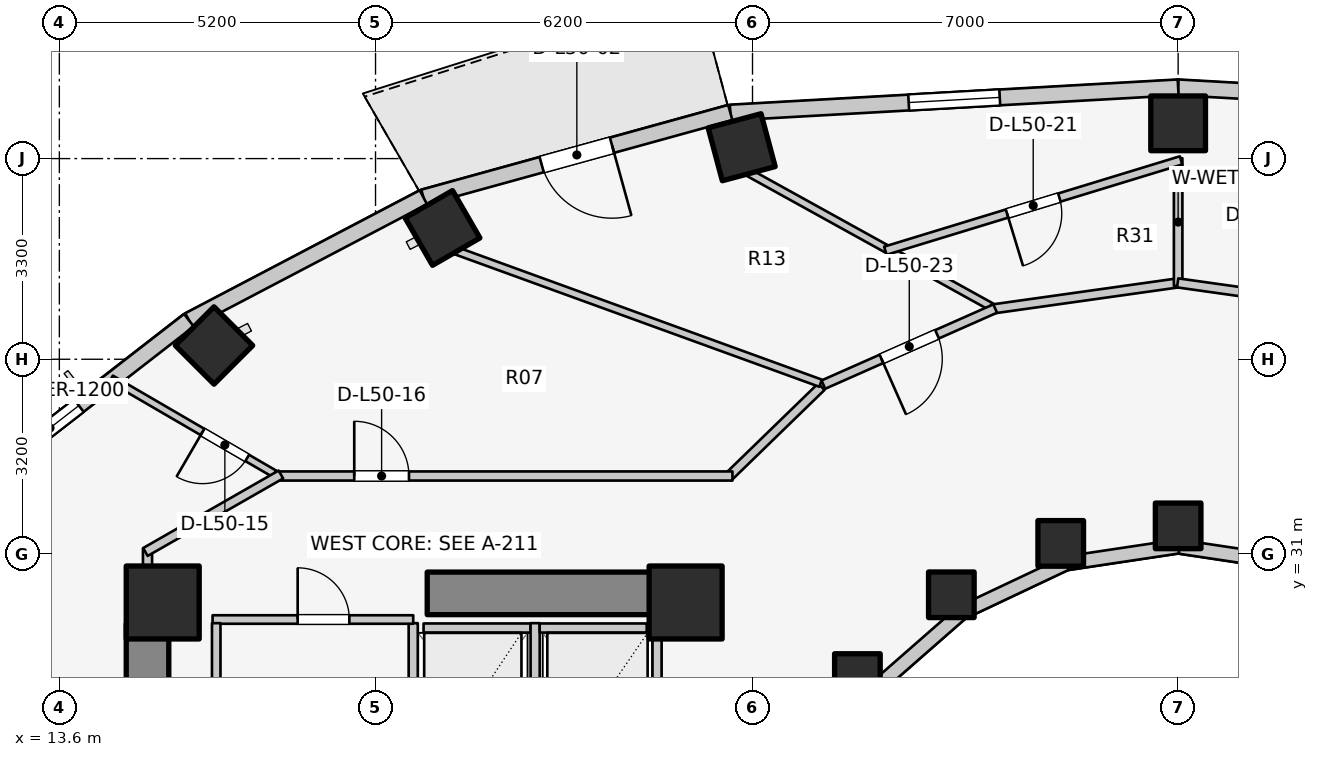
"""IFC4 building model, lengths in metres.
Left out: names, types, materials, properties, quantities, classifications, styles, units other than length and angle.
Written with IfcOpenShell. Run it as: python <this file> out.ifc"""

import sys

from ifc_helpers import new_model, si_unit, direction, frame, frame_2d, origin, origin_2d, place, context, subcontext, project, spatial, rectangle, extrude, element, fill, save


model = new_model("IFC4")
c1 = context("Model", 3, precision=1e-05, world=origin(), true_north=direction((0.0, 1.0)))
c2 = subcontext(c1, "Body", "Model", "MODEL_VIEW")
j1 = project(units=[si_unit("LENGTHUNIT", "METRE"), si_unit("PLANEANGLEUNIT", "RADIAN")], contexts=[c1])
p1 = place(None, origin())
s1 = spatial("IfcSite", under=j1, at=p1, CompositionType="ELEMENT")
p2 = place(p1, origin())
s2 = spatial("IfcBuilding", under=s1, at=p2, CompositionType="ELEMENT")
p3 = place(p2, frame((0.0, 0.0, 165.3)))
s3 = spatial("IfcBuildingStorey", under=s2, at=p3, CompositionType="ELEMENT", Elevation=165.3)
p4 = place(p3, frame((15.05, 17.05, 0.0), z_axis=(0.0, 0.0, 1.0), x_axis=(0.0, 1.0, 0.0)))
e1 = element("IfcWall", 1, at=p4, inside=s3, PredefinedType="SHEAR", context=c2, shape_type="SweptSolid", body=[
    extrude(rectangle(XDim=12.8, YDim=0.7, at=frame_2d((6.4, 0.0))), origin(), (0.0, 0.0, 1.0), 3.1),
])
p5 = place(p3, frame((19.65, 30.35, 0.0), z_axis=(0.0, 0.0, 1.0), x_axis=(1.0, 0.0, 0.0)))
e2 = element("IfcWall", 2, at=p5, inside=s3, PredefinedType="SHEAR", context=c2, shape_type="SweptSolid", body=[
    extrude(rectangle(XDim=4.5, YDim=0.7, at=frame_2d((2.25, 0.0))), origin(), (0.0, 0.0, 1.0), 3.1),
])
for number, where, z_axis, x_axis in (
    (3, (23.9, 30.2, 0.0), (0.0, 0.0, 1.0), (1.0, 0.0, 0.0)),
    (4, (15.3, 30.2, 0.0), (0.0, 0.0, 1.0), (1.0, 0.0, 0.0)),
):
    element("IfcColumn", number, at=place(p3, frame(where, z_axis=z_axis, x_axis=x_axis)), inside=s3, PredefinedType="COLUMN", context=c2, shape_type="SweptSolid", body=[
        extrude(rectangle(XDim=1.2, YDim=1.2, at=origin_2d()), origin(), (0.0, 0.0, 1.0), 3.1),
    ])
p6 = place(p3, frame((32.0, 31.46, 0.0), z_axis=(0.0, 0.0, 1.0), x_axis=(1.0, 0.0, 0.0)))
e5 = element("IfcColumn", 5, at=p6, inside=s3, PredefinedType="COLUMN", context=c2, shape_type="SweptSolid", body=[
    extrude(rectangle(XDim=0.75, YDim=0.75, at=origin_2d()), origin(), (0.0, 0.0, 1.0), 3.1),
])
p7 = place(p3, frame((32.0, 38.08, 0.0), z_axis=(0.0, 0.0, 1.0), x_axis=(0.0, 1.0, 0.0)))
e6 = element("IfcColumn", 6, at=p7, inside=s3, PredefinedType="COLUMN", context=c2, shape_type="SweptSolid", body=[
    extrude(rectangle(XDim=0.9, YDim=0.9, at=origin_2d()), origin(), (0.0, 0.0, 1.0), 3.1),
])
p8 = place(p3, frame((30.069, 31.172, 0.0), z_axis=(0.0, 0.0, 1.0), x_axis=(1.0, 0.0, 0.0)))
e7 = element("IfcColumn", 7, at=p8, inside=s3, PredefinedType="COLUMN", context=c2, shape_type="SweptSolid", body=[
    extrude(rectangle(XDim=0.75, YDim=0.75, at=origin_2d()), origin(), (0.0, 0.0, 1.0), 3.1),
])
p9 = place(p3, frame((24.822, 37.687, 0.0), z_axis=(0.0, 0.0, 1.0), x_axis=(-0.258819045103, 0.965925826289, 0.0)))
e8 = element("IfcColumn", 8, at=p9, inside=s3, PredefinedType="COLUMN", context=c2, shape_type="SweptSolid", body=[
    extrude(rectangle(XDim=0.9, YDim=0.9, at=origin_2d()), origin(), (0.0, 0.0, 1.0), 3.1),
])
p10 = place(p3, frame((28.27, 30.327, 0.0), z_axis=(0.0, 0.0, 1.0), x_axis=(1.0, 0.0, 0.0)))
e9 = element("IfcColumn", 9, at=p10, inside=s3, PredefinedType="COLUMN", context=c2, shape_type="SweptSolid", body=[
    extrude(rectangle(XDim=0.75, YDim=0.75, at=origin_2d()), origin(), (0.0, 0.0, 1.0), 3.1),
])
p11 = place(p3, frame((19.902, 36.359, 0.0), z_axis=(0.0, 0.0, 1.0), x_axis=(-0.5, 0.866025403784, 0.0)))
e10 = element("IfcColumn", 10, at=p11, inside=s3, PredefinedType="COLUMN", context=c2, shape_type="SweptSolid", body=[
    extrude(rectangle(XDim=0.9, YDim=0.9, at=origin_2d()), origin(), (0.0, 0.0, 1.0), 3.1),
])
p12 = place(p3, frame((26.725, 28.982, 0.0), z_axis=(0.0, 0.0, 1.0), x_axis=(1.0, 0.0, 0.0)))
e11 = element("IfcColumn", 11, at=p12, inside=s3, PredefinedType="COLUMN", context=c2, shape_type="SweptSolid", body=[
    extrude(rectangle(XDim=0.75, YDim=0.75, at=origin_2d()), origin(), (0.0, 0.0, 1.0), 3.1),
])
p13 = place(p3, frame((16.143, 34.427, 0.0), z_axis=(0.0, 0.0, 1.0), x_axis=(-0.707106781187, 0.707106781187, 0.0)))
e12 = element("IfcColumn", 12, at=p13, inside=s3, PredefinedType="COLUMN", context=c2, shape_type="SweptSolid", body=[
    extrude(rectangle(XDim=0.9, YDim=0.9, at=origin_2d()), origin(), (0.0, 0.0, 1.0), 3.1),
])
for number, where, z_axis, x_axis in (
    (13, (33.843, 30.843, 0.0), (0.0, 0.0, 1.0), (-0.989, 0.149, 0.0)),
    (14, (32.0, 31.12, 0.0), (0.0, 0.0, 1.0), (-0.989, -0.149, 0.0)),
):
    element("IfcWall", number, at=place(p3, frame(where, z_axis=z_axis, x_axis=x_axis)), inside=s3, PredefinedType="STANDARD", context=c2, shape_type="SweptSolid", body=[
        extrude(rectangle(XDim=1.864, YDim=0.23, at=frame_2d((0.932, 0.0))), origin(), (0.0, 0.0, 1.0), 2.16),
    ])
p14 = place(p3, frame((30.157, 30.843, 0.0), z_axis=(0.0, 0.0, 1.0), x_axis=(-0.904179699603, -0.427152280606, 0.0)))
e15 = element("IfcWall", 15, at=p14, inside=s3, PredefinedType="STANDARD", context=c2, shape_type="SweptSolid", body=[
    extrude(rectangle(XDim=1.899, YDim=0.23, at=frame_2d((0.95, 0.0))), origin(), (0.0, 0.0, 1.0), 2.16),
])
p15 = place(p3, frame((28.44, 30.032, 0.0), z_axis=(0.0, 0.0, 1.0), x_axis=(-0.752576694707, -0.658504607869, 0.0)))
e16 = element("IfcWall", 16, at=p15, inside=s3, PredefinedType="STANDARD", context=c2, shape_type="SweptSolid", body=[
    extrude(rectangle(XDim=1.959, YDim=0.23, at=frame_2d((0.98, 0.0))), origin(), (0.0, 0.0, 1.0), 2.16),
])
p16 = place(p3, frame((39.365, 38.257, 0.0), z_axis=(0.0, 0.0, 1.0), x_axis=(-0.998417906562, 0.056228852534, 0.0)))
e17 = element("IfcWall", 17, at=p16, inside=s3, PredefinedType="STANDARD", context=c2, shape_type="SweptSolid", body=[
    extrude(rectangle(XDim=7.377, YDim=0.26, at=frame_2d((3.688, 0.0))), origin(), (0.0, 0.0, 1.0), 2.85),
])
p17 = place(p16, frame((2.938, 0.0, 0.75)))
e18 = element("IfcOpeningElement", 18, at=p17, cuts=e17, PredefinedType="OPENING", context=c2, shape_type="SweptSolid", body=[
    extrude(rectangle(XDim=1.5, YDim=1.6, at=frame_2d((0.75, 0.8))), frame((0.0, 0.14, 0.0), z_axis=(0.0, -1.0, 0.0), x_axis=(1.0, 0.0, 0.0)), (0.0, 0.0, 1.0), 0.28),
])
p18 = place(p3, frame((32.0, 38.671, 0.0), z_axis=(0.0, 0.0, 1.0), x_axis=(-0.998417906562, -0.056228852534, 0.0)))
e19 = element("IfcWall", 19, at=p18, inside=s3, PredefinedType="STANDARD", context=c2, shape_type="SweptSolid", body=[
    extrude(rectangle(XDim=7.377, YDim=0.26, at=frame_2d((3.688, 0.0))), origin(), (0.0, 0.0, 1.0), 2.85),
])
p19 = place(p18, frame((2.938, 0.0, 0.75)))
e20 = element("IfcOpeningElement", 20, at=p19, cuts=e19, PredefinedType="OPENING", context=c2, shape_type="SweptSolid", body=[
    extrude(rectangle(XDim=1.5, YDim=1.6, at=frame_2d((0.75, 0.8))), frame((0.0, 0.14, 0.0), z_axis=(0.0, -1.0, 0.0), x_axis=(1.0, 0.0, 0.0)), (0.0, 0.0, 1.0), 0.28),
])
p20 = place(p3, frame((24.635, 38.257, 0.0), z_axis=(0.0, 0.0, 1.0), x_axis=(-0.963953455704, -0.26607092144, 0.0)))
e21 = element("IfcWall", 21, at=p20, inside=s3, PredefinedType="STANDARD", context=c2, shape_type="SweptSolid", body=[
    extrude(rectangle(XDim=5.237, YDim=0.26, at=frame_2d((2.618, 0.0))), origin(), (0.0, 0.0, 1.0), 2.88),
])
p21 = place(p20, frame((2.018, 0.0, 0.0)))
e22 = element("IfcOpeningElement", 22, at=p21, cuts=e21, PredefinedType="OPENING", context=c2, shape_type="SweptSolid", body=[
    extrude(rectangle(XDim=1.2, YDim=2.2, at=frame_2d((0.6, 1.1))), frame((0.0, 0.14, 0.0), z_axis=(0.0, -1.0, 0.0), x_axis=(1.0, 0.0, 0.0)), (0.0, 0.0, 1.0), 0.28),
])
p22 = place(p3, frame((19.587, 36.863, 0.0), z_axis=(0.0, 0.0, 1.0), x_axis=(-0.885660265226, -0.464333818065, 0.0)))
e23 = element("IfcWall", 23, at=p22, inside=s3, PredefinedType="STANDARD", context=c2, shape_type="SweptSolid", body=[
    extrude(rectangle(XDim=4.354, YDim=0.26, at=frame_2d((2.177, 0.0))), origin(), (0.0, 0.0, 1.0), 2.85),
])
p23 = place(p3, frame((15.731, 34.842, 0.0), z_axis=(0.0, 0.0, 1.0), x_axis=(-0.790185650662, -0.612867552973, 0.0)))
e24 = element("IfcWall", 24, at=p23, inside=s3, PredefinedType="STANDARD", context=c2, shape_type="SweptSolid", body=[
    extrude(rectangle(XDim=4.239, YDim=0.26, at=frame_2d((2.12, 0.0))), origin(), (0.0, 0.0, 1.0), 2.85),
])
p24 = place(p23, frame((2.29, 0.0, 0.75)))
e25 = element("IfcOpeningElement", 25, at=p24, cuts=e24, PredefinedType="OPENING", context=c2, shape_type="SweptSolid", body=[
    extrude(rectangle(XDim=1.2, YDim=1.5, at=frame_2d((0.6, 0.75))), frame((0.0, 0.14, 0.0), z_axis=(0.0, -1.0, 0.0), x_axis=(1.0, 0.0, 0.0)), (0.0, 0.0, 1.0), 0.28),
])
p25 = place(p3, frame((19.59, 29.78, 0.0), z_axis=(0.0, 0.0, 1.0), x_axis=(1.0, 0.0, 0.0)))
e26 = element("IfcWall", 26, at=p25, inside=s3, PredefinedType="SOLIDWALL", context=c2, shape_type="SweptSolid", body=[
    extrude(rectangle(XDim=1.76, YDim=0.15, at=frame_2d((0.88, 0.0))), origin(), (0.0, 0.0, 1.0), 2.855),
])
for number, where, z_axis, x_axis in (
    (27, (19.42, 27.14, 0.0), (0.0, 0.0, 1.0), (0.0, 1.0, 0.0)),
    (28, (21.425, 27.14, 0.0), (0.0, 0.0, 1.0), (0.0, 1.0, 0.0)),
):
    element("IfcWall", number, at=place(p3, frame(where, z_axis=z_axis, x_axis=x_axis)), inside=s3, PredefinedType="SOLIDWALL", context=c2, shape_type="SweptSolid", body=[
        extrude(rectangle(XDim=2.72, YDim=0.15, at=frame_2d((1.36, 0.0))), origin(), (0.0, 0.0, 1.0), 2.855),
    ])
p26 = place(p3, frame((21.5, 29.78, 0.0), z_axis=(0.0, 0.0, 1.0), x_axis=(1.0, 0.0, 0.0)))
e29 = element("IfcWall", 29, at=p26, inside=s3, PredefinedType="SOLIDWALL", context=c2, shape_type="SweptSolid", body=[
    extrude(rectangle(XDim=1.76, YDim=0.15, at=frame_2d((0.88, 0.0))), origin(), (0.0, 0.0, 1.0), 2.855),
])
p27 = place(p3, frame((23.43, 27.14, 0.0), z_axis=(0.0, 0.0, 1.0), x_axis=(0.0, 1.0, 0.0)))
e30 = element("IfcWall", 30, at=p27, inside=s3, PredefinedType="SOLIDWALL", context=c2, shape_type="SweptSolid", body=[
    extrude(rectangle(XDim=2.72, YDim=0.15, at=frame_2d((1.36, 0.0))), origin(), (0.0, 0.0, 1.0), 2.855),
])
p28 = place(p3, frame((16.12, 29.92, 0.0), z_axis=(0.0, 0.0, 1.0), x_axis=(1.0, 0.0, 0.0)))
e31 = element("IfcWall", 31, at=p28, inside=s3, PredefinedType="PLUMBINGWALL", context=c2, shape_type="SweptSolid", body=[
    extrude(rectangle(XDim=3.3, YDim=0.14, at=frame_2d((1.65, 0.0))), origin(), (0.0, 0.0, 1.0), 2.855),
])
p29 = place(p28, frame((1.399, 0.0, 0.0)))
e32 = element("IfcOpeningElement", 32, at=p29, cuts=e31, PredefinedType="OPENING", context=c2, shape_type="SweptSolid", body=[
    extrude(rectangle(XDim=0.85, YDim=2.05, at=frame_2d((0.425, 1.025))), frame((0.0, 0.08, 0.0), z_axis=(0.0, -1.0, 0.0), x_axis=(1.0, 0.0, 0.0)), (0.0, 0.0, 1.0), 0.16),
])
p30 = place(p3, frame((16.18, 25.98, 0.0), z_axis=(0.0, 0.0, 1.0), x_axis=(0.0, 1.0, 0.0)))
e33 = element("IfcWall", 33, at=p30, inside=s3, PredefinedType="PLUMBINGWALL", context=c2, shape_type="SweptSolid", body=[
    extrude(rectangle(XDim=3.88, YDim=0.14, at=frame_2d((1.94, 0.0))), origin(), (0.0, 0.0, 1.0), 2.855),
])
p31 = place(p3, frame((15.05, 29.8, 0.0), z_axis=(0.0, 0.0, 1.0), x_axis=(0.0, 1.0, 0.0)))
e34 = element("IfcWall", 34, at=p31, inside=s3, PredefinedType="PARTITIONING", context=c2, shape_type="SweptSolid", body=[
    extrude(rectangle(XDim=1.29, YDim=0.15, at=frame_2d((0.645, 0.0))), origin(), (0.0, 0.0, 1.0), 2.855),
])
p32 = place(p3, frame((17.243, 32.255, 0.0), z_axis=(0.0, 0.0, 1.0), x_axis=(-0.864408655832, 0.502789892224, 0.0)))
e35 = element("IfcWall", 35, at=p32, inside=s3, PredefinedType="MOVABLE", context=c2, shape_type="SweptSolid", body=[
    extrude(rectangle(XDim=3.23, YDim=0.12, at=frame_2d((1.615, 0.0))), origin(), (0.0, 0.0, 1.0), 2.22),
])
p33 = place(p32, frame((0.641, 0.0, 0.0)))
e36 = element("IfcOpeningElement", 36, at=p33, cuts=e35, PredefinedType="OPENING", context=c2, shape_type="SweptSolid", body=[
    extrude(rectangle(XDim=0.85, YDim=2.05, at=frame_2d((0.425, 1.025))), frame((0.0, 0.07, 0.0), z_axis=(0.0, -1.0, 0.0), x_axis=(1.0, 0.0, 0.0)), (0.0, 0.0, 1.0), 0.14),
])
p34 = place(p3, frame((26.133, 33.749, 0.0), z_axis=(0.0, 0.0, 1.0), x_axis=(-0.717419568599, -0.696641344302, 0.0)))
e37 = element("IfcWall", 37, at=p34, inside=s3, PredefinedType="PARTITIONING", context=c2, shape_type="SweptSolid", body=[
    extrude(rectangle(XDim=2.138, YDim=0.15, at=frame_2d((1.069, 0.0))), origin(), (0.0, 0.0, 1.0), 2.299),
])
p35 = place(p3, frame((17.15, 32.28, 0.0), z_axis=(0.0, 0.0, 1.0), x_axis=(1.0, 0.0, 0.0)))
e38 = element("IfcWall", 38, at=p35, inside=s3, PredefinedType="PARTITIONING", context=c2, shape_type="SweptSolid", body=[
    extrude(rectangle(XDim=7.52, YDim=0.15, at=frame_2d((3.76, 0.0))), origin(), (0.0, 0.0, 1.0), 2.299),
])
p36 = place(p35, frame((1.3, 0.0, 0.0)))
e39 = element("IfcOpeningElement", 39, at=p36, cuts=e38, PredefinedType="OPENING", context=c2, shape_type="SweptSolid", body=[
    extrude(rectangle(XDim=0.9, YDim=2.1, at=frame_2d((0.45, 1.05))), frame((0.0, 0.085, 0.0), z_axis=(0.0, -1.0, 0.0), x_axis=(1.0, 0.0, 0.0)), (0.0, 0.0, 1.0), 0.17),
])
p37 = place(p3, frame((17.243, 32.305, 0.0), z_axis=(0.0, 0.0, 1.0), x_axis=(-0.867991349648, -0.496579315857, 0.0)))
e40 = element("IfcWall", 40, at=p37, inside=s3, PredefinedType="PARTITIONING", context=c2, shape_type="SweptSolid", body=[
    extrude(rectangle(XDim=2.567, YDim=0.15, at=frame_2d((1.283, 0.0))), origin(), (0.0, 0.0, 1.0), 2.22),
])
p38 = place(p3, frame((28.935, 35.058, 0.0), z_axis=(0.0, 0.0, 1.0), x_axis=(-0.875077338582, 0.48398311076, 0.0)))
e41 = element("IfcWall", 41, at=p38, inside=s3, PredefinedType="PARTITIONING", context=c2, shape_type="SweptSolid", body=[
    extrude(rectangle(XDim=4.573, YDim=0.125, at=frame_2d((2.287, 0.0))), origin(), (0.0, 0.0, 1.0), 2.299),
])
p39 = place(p3, frame((26.12, 33.806, 0.0), z_axis=(0.0, 0.0, 1.0), x_axis=(-0.939901628116, 0.341445353557, 0.0)))
e42 = element("IfcWall", 42, at=p39, inside=s3, PredefinedType="PARTITIONING", context=c2, shape_type="SweptSolid", body=[
    extrude(rectangle(XDim=6.387, YDim=0.125, at=frame_2d((3.194, 0.0))), origin(), (0.0, 0.0, 1.0), 2.299),
])
p40 = place(p3, frame((32.05, 35.463, 0.0), z_axis=(0.0, 0.0, 1.0), x_axis=(-0.990254405439, -0.139270285808, 0.0)))
e43 = element("IfcWall", 43, at=p40, inside=s3, PredefinedType="PARTITIONING", context=c2, shape_type="SweptSolid", body=[
    extrude(rectangle(XDim=3.147, YDim=0.15, at=frame_2d((1.573, 0.0))), origin(), (0.0, 0.0, 1.0), 2.299),
])
p41 = place(p3, frame((32.0, 35.406, 0.0), z_axis=(0.0, 0.0, 1.0), x_axis=(0.0, 1.0, 0.0)))
e44 = element("IfcWall", 44, at=p41, inside=s3, PredefinedType="PLUMBINGWALL", context=c2, shape_type="SweptSolid", body=[
    extrude(rectangle(XDim=2.1, YDim=0.14, at=frame_2d((1.05, 0.0))), origin(), (0.0, 0.0, 1.0), 2.299),
])
p42 = place(p3, frame((32.048, 37.471, 0.0), z_axis=(0.0, 0.0, 1.0), x_axis=(-0.956348216259, -0.292229514694, 0.0)))
e45 = element("IfcWall", 45, at=p42, inside=s3, PredefinedType="PLUMBINGWALL", context=c2, shape_type="SweptSolid", body=[
    extrude(rectangle(XDim=5.084, YDim=0.14, at=frame_2d((2.542, 0.0))), origin(), (0.0, 0.0, 1.0), 2.299),
])
p43 = place(p42, frame((2.092, 0.0, 0.0)))
e46 = element("IfcOpeningElement", 46, at=p43, cuts=e45, PredefinedType="OPENING", context=c2, shape_type="SweptSolid", body=[
    extrude(rectangle(XDim=0.9, YDim=2.1, at=frame_2d((0.45, 1.05))), frame((0.0, 0.08, 0.0), z_axis=(0.0, -1.0, 0.0), x_axis=(1.0, 0.0, 0.0)), (0.0, 0.0, 1.0), 0.16),
])
p44 = place(p3, frame((35.025, 35.029, 0.0), z_axis=(0.0, 0.0, 1.0), x_axis=(-0.990243864279, 0.139345216129, 0.0)))
e47 = element("IfcWall", 47, at=p44, inside=s3, PredefinedType="PARTITIONING", context=c2, shape_type="SweptSolid", body=[
    extrude(rectangle(XDim=3.062, YDim=0.15, at=frame_2d((1.531, 0.0))), origin(), (0.0, 0.0, 1.0), 2.299),
])
p45 = place(p44, frame((1.031, 0.0, 0.0)))
e48 = element("IfcOpeningElement", 48, at=p45, cuts=e47, PredefinedType="OPENING", context=c2, shape_type="SweptSolid", body=[
    extrude(rectangle(XDim=1.0, YDim=2.1, at=frame_2d((0.5, 1.05))), frame((0.0, 0.085, 0.0), z_axis=(0.0, -1.0, 0.0), x_axis=(1.0, 0.0, 0.0)), (0.0, 0.0, 1.0), 0.17),
])
p46 = place(p3, frame((28.991, 35.034, 0.0), z_axis=(0.0, 0.0, 1.0), x_axis=(-0.91445214467, -0.404694051239, 0.0)))
e49 = element("IfcWall", 49, at=p46, inside=s3, PredefinedType="PARTITIONING", context=c2, shape_type="SweptSolid", body=[
    extrude(rectangle(XDim=3.091, YDim=0.15, at=frame_2d((1.545, 0.0))), origin(), (0.0, 0.0, 1.0), 2.299),
])
p47 = place(p46, frame((1.045, 0.0, 0.0)))
e50 = element("IfcOpeningElement", 50, at=p47, cuts=e49, PredefinedType="OPENING", context=c2, shape_type="SweptSolid", body=[
    extrude(rectangle(XDim=1.0, YDim=2.1, at=frame_2d((0.5, 1.05))), frame((0.0, 0.085, 0.0), z_axis=(0.0, -1.0, 0.0), x_axis=(1.0, 0.0, 0.0)), (0.0, 0.0, 1.0), 0.17),
])
p48 = place(p19, origin())
e51 = element("IfcWindow", 51, at=p48, inside=s3, PartitioningType="SINGLE_PANEL", PredefinedType="WINDOW", context=c2, shape_type="SweptSolid", body=[
    extrude(rectangle(XDim=1.5, YDim=1.6, at=frame_2d((0.75, 0.8))), frame((0.0, 0.03, 0.0), z_axis=(0.0, -1.0, 0.0), x_axis=(1.0, 0.0, 0.0)), (0.0, 0.0, 1.0), 0.06),
])
fill(e20, e51)
p49 = place(p21, origin())
e52 = element("IfcDoor", 52, at=p49, inside=s3, OperationType="SINGLE_SWING_LEFT", PredefinedType="DOOR", context=c2, shape_type="SweptSolid", body=[
    extrude(rectangle(XDim=1.2, YDim=2.2, at=frame_2d((0.6, 1.1))), frame((0.0, 0.025, 0.0), z_axis=(0.0, -1.0, 0.0), x_axis=(1.0, 0.0, 0.0)), (0.0, 0.0, 1.0), 0.05),
])
fill(e22, e52)
p50 = place(p24, origin())
e53 = element("IfcWindow", 53, at=p50, inside=s3, PartitioningType="SINGLE_PANEL", PredefinedType="WINDOW", context=c2, shape_type="SweptSolid", body=[
    extrude(rectangle(XDim=1.2, YDim=1.5, at=frame_2d((0.6, 0.75))), frame((0.0, 0.03, 0.0), z_axis=(0.0, -1.0, 0.0), x_axis=(1.0, 0.0, 0.0)), (0.0, 0.0, 1.0), 0.06),
])
fill(e25, e53)
p51 = place(p29, origin())
e54 = element("IfcDoor", 54, at=p51, inside=s3, OperationType="SINGLE_SWING_LEFT", PredefinedType="DOOR", context=c2, shape_type="SweptSolid", body=[
    extrude(rectangle(XDim=0.85, YDim=2.05, at=frame_2d((0.425, 1.025))), frame((0.0, 0.025, 0.0), z_axis=(0.0, -1.0, 0.0), x_axis=(1.0, 0.0, 0.0)), (0.0, 0.0, 1.0), 0.05),
])
fill(e32, e54)
p52 = place(p33, origin())
e55 = element("IfcDoor", 55, at=p52, inside=s3, OperationType="SINGLE_SWING_RIGHT", PredefinedType="DOOR", context=c2, shape_type="SweptSolid", body=[
    extrude(rectangle(XDim=0.85, YDim=2.05, at=frame_2d((0.425, 1.025))), frame((0.0, 0.025, 0.0), z_axis=(0.0, -1.0, 0.0), x_axis=(1.0, 0.0, 0.0)), (0.0, 0.0, 1.0), 0.05),
])
fill(e36, e55)
p53 = place(p36, origin())
e56 = element("IfcDoor", 56, at=p53, inside=s3, OperationType="SINGLE_SWING_LEFT", PredefinedType="DOOR", context=c2, shape_type="SweptSolid", body=[
    extrude(rectangle(XDim=0.9, YDim=2.1, at=frame_2d((0.45, 1.05))), frame((0.0, 0.025, 0.0), z_axis=(0.0, -1.0, 0.0), x_axis=(1.0, 0.0, 0.0)), (0.0, 0.0, 1.0), 0.05),
])
fill(e39, e56)
p54 = place(p43, origin())
e57 = element("IfcDoor", 57, at=p54, inside=s3, OperationType="SINGLE_SWING_RIGHT", PredefinedType="DOOR", context=c2, shape_type="SweptSolid", body=[
    extrude(rectangle(XDim=0.9, YDim=2.1, at=frame_2d((0.45, 1.05))), frame((0.0, 0.025, 0.0), z_axis=(0.0, -1.0, 0.0), x_axis=(1.0, 0.0, 0.0)), (0.0, 0.0, 1.0), 0.05),
])
fill(e46, e57)
p55 = place(p47, origin())
e58 = element("IfcDoor", 58, at=p55, inside=s3, OperationType="SINGLE_SWING_RIGHT", PredefinedType="DOOR", context=c2, shape_type="SweptSolid", body=[
    extrude(rectangle(XDim=1.0, YDim=2.1, at=frame_2d((0.5, 1.05))), frame((0.0, 0.025, 0.0), z_axis=(0.0, -1.0, 0.0), x_axis=(1.0, 0.0, 0.0)), (0.0, 0.0, 1.0), 0.05),
])
fill(e50, e58)
save(model, sys.argv[1])
